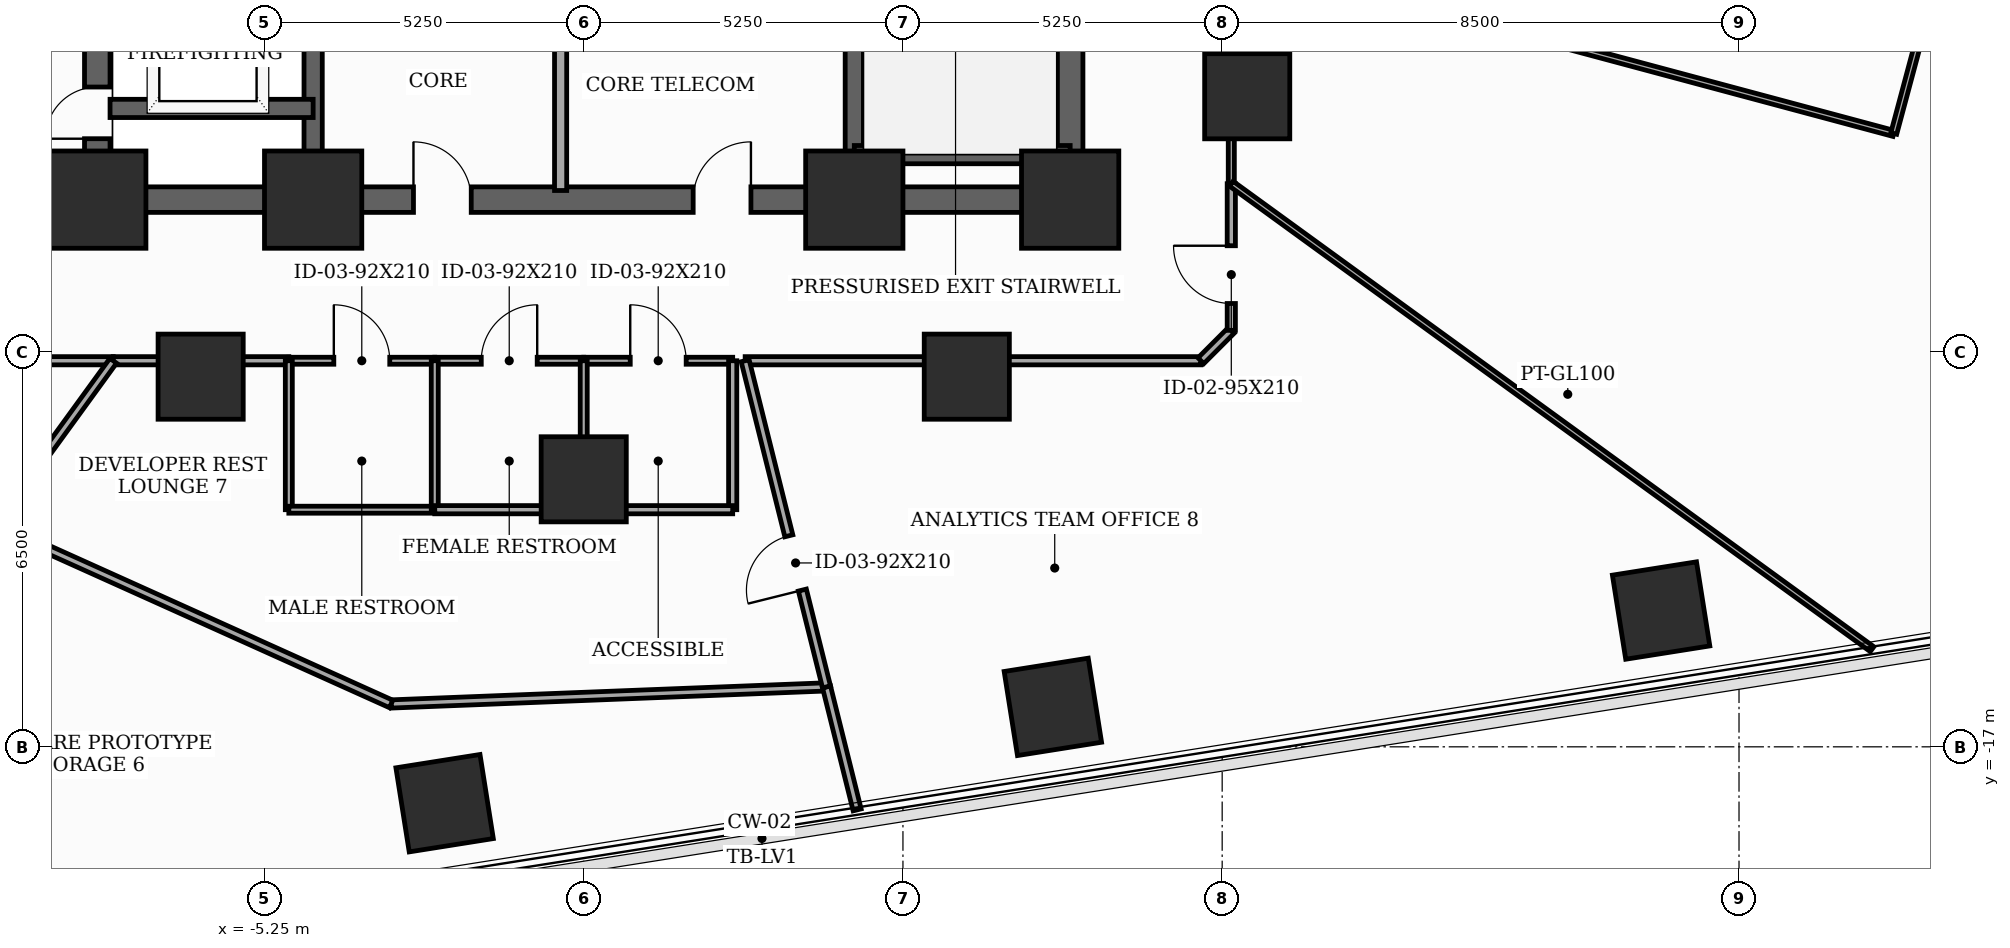
"""IFC4 building model, lengths in metres.
Left out: names, types, materials, properties, quantities, classifications, styles, units other than length and angle.
Written with IfcOpenShell. Run it as: python <this file> out.ifc"""

import sys

from ifc_helpers import new_model, si_unit, direction, frame, frame_2d, origin, origin_2d, place, context, subcontext, project, spatial, rectangle, extrude, element, fill, save


model = new_model("IFC4")
c1 = context("Model", 3, precision=1e-05, world=origin(), true_north=direction((0.0, 1.0)))
c2 = subcontext(c1, "Body", "Model", "MODEL_VIEW")
j1 = project(units=[si_unit("LENGTHUNIT", "METRE"), si_unit("PLANEANGLEUNIT", "RADIAN")], contexts=[c1])
p1 = place(None, origin())
s1 = spatial("IfcSite", under=j1, at=p1, CompositionType="ELEMENT")
p2 = place(p1, origin())
s2 = spatial("IfcBuilding", under=s1, at=p2, CompositionType="ELEMENT")
p3 = place(p2, frame((0.0, 0.0, 63.0)))
s3 = spatial("IfcBuildingStorey", under=s2, at=p3, CompositionType="ELEMENT", Elevation=63.0)
for number, where, z_axis, x_axis in (
    (1, (-8.0, -8.0, 0.0), (0.0, 0.0, 1.0), (1.0, 0.0, 0.0)),
    (2, (-4.45, -8.0, 0.0), (0.0, 0.0, 1.0), (1.0, 0.0, 0.0)),
    (3, (4.45, -8.0, 0.0), (0.0, 0.0, 1.0), (1.0, 0.0, 0.0)),
    (4, (8.0, -8.0, 0.0), (0.0, 0.0, 1.0), (1.0, 0.0, 0.0)),
):
    element("IfcColumn", number, at=place(p3, frame(where, z_axis=z_axis, x_axis=x_axis)), inside=s3, PredefinedType="COLUMN", context=c2, shape_type="SweptSolid", body=[
        extrude(rectangle(XDim=1.6, YDim=1.6, at=origin_2d()), origin(), (0.0, 0.0, 1.0), 3.7),
    ])
for number, where, z_axis, x_axis in (
    (5, (-6.3, -10.912, 0.0), (0.0, 0.0, 1.0), (1.0, 0.0, 0.0)),
    (6, (0.0, -12.6, 0.0), (0.0, 0.0, 1.0), (1.0, 0.0, 0.0)),
    (7, (6.3, -10.912, 0.0), (0.0, 0.0, 1.0), (1.0, 0.0, 0.0)),
    (8, (10.912, -6.3, 0.0), (0.0, 0.0, 1.0), (1.0, 0.0, 0.0)),
    (9, (-2.288, -17.927, 0.0), (0.0, 0.0, 1.0), (0.988, 0.156, 0.0)),
    (10, (7.716, -16.343, 0.0), (0.0, 0.0, 1.0), (0.988, 0.156, 0.0)),
    (11, (17.719, -14.758, 0.0), (0.0, 0.0, 1.0), (0.988, 0.156, 0.0)),
):
    element("IfcColumn", number, at=place(p3, frame(where, z_axis=z_axis, x_axis=x_axis)), inside=s3, PredefinedType="COLUMN", context=c2, shape_type="SweptSolid", body=[
        extrude(rectangle(XDim=1.4, YDim=1.4, at=origin_2d()), origin(), (0.0, 0.0, 1.0), 3.7),
    ])
p4 = place(p3, frame((-8.0, -8.0, 0.0), z_axis=(0.0, 0.0, 1.0), x_axis=(0.0, 1.0, 0.0)))
e12 = element("IfcWall", 12, at=p4, inside=s3, PredefinedType="SHEAR", context=c2, shape_type="SweptSolid", body=[
    extrude(rectangle(XDim=16.0, YDim=0.42, at=frame_2d((8.0, 0.0))), origin(), (0.0, 0.0, 1.0), 3.5),
])
p5 = place(p4, frame((1.002, 0.0, 0.0)))
e13 = element("IfcOpeningElement", 13, at=p5, cuts=e12, PredefinedType="OPENING", context=c2, shape_type="SweptSolid", body=[
    extrude(rectangle(XDim=0.85, YDim=2.02, at=frame_2d((0.425, 1.01))), frame((0.0, 0.22, 0.0), z_axis=(0.0, -1.0, 0.0), x_axis=(1.0, 0.0, 0.0)), (0.0, 0.0, 1.0), 0.44),
])
p6 = place(p4, frame((5.35, 0.0, 0.0)))
e14 = element("IfcOpeningElement", 14, at=p6, cuts=e12, PredefinedType="OPENING", context=c2, shape_type="SweptSolid", body=[
    extrude(rectangle(XDim=1.05, YDim=2.15, at=frame_2d((0.525, 1.075))), frame((0.0, 0.22, 0.0), z_axis=(0.0, -1.0, 0.0), x_axis=(1.0, 0.0, 0.0)), (0.0, 0.0, 1.0), 0.44),
])
p7 = place(p3, frame((8.0, -8.0, 0.0), z_axis=(0.0, 0.0, 1.0), x_axis=(0.0, 1.0, 0.0)))
e15 = element("IfcWall", 15, at=p7, inside=s3, PredefinedType="SHEAR", context=c2, shape_type="SweptSolid", body=[
    extrude(rectangle(XDim=16.0, YDim=0.42, at=frame_2d((8.0, 0.0))), origin(), (0.0, 0.0, 1.0), 3.5),
])
p8 = place(p7, frame((9.6, 0.0, 0.0)))
e16 = element("IfcOpeningElement", 16, at=p8, cuts=e15, PredefinedType="OPENING", context=c2, shape_type="SweptSolid", body=[
    extrude(rectangle(XDim=1.05, YDim=2.15, at=frame_2d((0.525, 1.075))), frame((0.0, 0.22, 0.0), z_axis=(0.0, -1.0, 0.0), x_axis=(1.0, 0.0, 0.0)), (0.0, 0.0, 1.0), 0.44),
])
p9 = place(p7, frame((14.148, 0.0, 0.0)))
e17 = element("IfcOpeningElement", 17, at=p9, cuts=e15, PredefinedType="OPENING", context=c2, shape_type="SweptSolid", body=[
    extrude(rectangle(XDim=0.85, YDim=2.02, at=frame_2d((0.425, 1.01))), frame((0.0, 0.22, 0.0), z_axis=(0.0, -1.0, 0.0), x_axis=(1.0, 0.0, 0.0)), (0.0, 0.0, 1.0), 0.44),
])
p10 = place(p3, frame((-8.0, -8.0, 0.0), z_axis=(0.0, 0.0, 1.0), x_axis=(1.0, 0.0, 0.0)))
e18 = element("IfcWall", 18, at=p10, inside=s3, PredefinedType="SHEAR", context=c2, shape_type="SweptSolid", body=[
    extrude(rectangle(XDim=16.0, YDim=0.42, at=frame_2d((8.0, 0.0))), origin(), (0.0, 0.0, 1.0), 3.5),
])
p11 = place(p10, frame((5.2, 0.0, 0.0)))
e19 = element("IfcOpeningElement", 19, at=p11, cuts=e18, PredefinedType="OPENING", context=c2, shape_type="SweptSolid", body=[
    extrude(rectangle(XDim=0.95, YDim=2.1, at=frame_2d((0.475, 1.05))), frame((0.0, 0.22, 0.0), z_axis=(0.0, -1.0, 0.0), x_axis=(1.0, 0.0, 0.0)), (0.0, 0.0, 1.0), 0.44),
])
p12 = place(p10, frame((9.8, 0.0, 0.0)))
e20 = element("IfcOpeningElement", 20, at=p12, cuts=e18, PredefinedType="OPENING", context=c2, shape_type="SweptSolid", body=[
    extrude(rectangle(XDim=0.95, YDim=2.1, at=frame_2d((0.475, 1.05))), frame((0.0, 0.22, 0.0), z_axis=(0.0, -1.0, 0.0), x_axis=(1.0, 0.0, 0.0)), (0.0, 0.0, 1.0), 0.44),
])
for number, where, z_axis, x_axis in (
    (21, (-4.45, -7.79, 0.0), (0.0, 0.0, 1.0), (0.0, 1.0, 0.0)),
    (22, (4.45, -7.79, 0.0), (0.0, 0.0, 1.0), (0.0, 1.0, 0.0)),
):
    element("IfcWall", number, at=place(p3, frame(where, z_axis=z_axis, x_axis=x_axis)), inside=s3, PredefinedType="SHEAR", context=c2, shape_type="SweptSolid", body=[
        extrude(rectangle(XDim=15.58, YDim=0.3, at=frame_2d((7.79, 0.0))), origin(), (0.0, 0.0, 1.0), 3.5),
    ])
p13 = place(p3, frame((4.45, -7.26, 0.0), z_axis=(0.0, 0.0, 1.0), x_axis=(1.0, 0.0, 0.0)))
e23 = element("IfcWall", 23, at=p13, inside=s3, PredefinedType="SHEAR", context=c2, shape_type="SweptSolid", body=[
    extrude(rectangle(XDim=3.55, YDim=0.3, at=frame_2d((1.775, 0.0))), origin(), (0.0, 0.0, 1.0), 3.5),
])
p14 = place(p3, frame((-7.79, -6.5, 0.0), z_axis=(0.0, 0.0, 1.0), x_axis=(1.0, 0.0, 0.0)))
e24 = element("IfcWall", 24, at=p14, inside=s3, PredefinedType="SHEAR", context=c2, shape_type="SweptSolid", body=[
    extrude(rectangle(XDim=3.34, YDim=0.3, at=frame_2d((1.67, 0.0))), origin(), (0.0, 0.0, 1.0), 3.5),
])
p15 = place(p3, frame((-0.38, -7.85, 0.0), z_axis=(0.0, 0.0, 1.0), x_axis=(0.0, 1.0, 0.0)))
e25 = element("IfcWall", 25, at=p15, inside=s3, PredefinedType="SOLIDWALL", context=c2, shape_type="SweptSolid", body=[
    extrude(rectangle(XDim=2.95, YDim=0.2, at=frame_2d((1.475, 0.0))), origin(), (0.0, 0.0, 1.0), 2.885),
])
p16 = place(p3, frame((10.65, -7.738, 0.0), z_axis=(0.0, 0.0, 1.0), x_axis=(0.0, 1.0, 0.0)))
e26 = element("IfcWall", 26, at=p16, inside=s3, PredefinedType="MOVABLE", context=c2, shape_type="SweptSolid", body=[
    extrude(rectangle(XDim=3.746, YDim=0.1, at=frame_2d((1.873, 0.0))), origin(), (0.0, 0.0, 1.0), 2.785),
])
p17 = place(p3, frame((10.65, -3.992, 0.0), z_axis=(0.0, 0.0, 1.0), x_axis=(0.965906888357, -0.258889712088, 0.0)))
e27 = element("IfcWall", 27, at=p17, inside=s3, PredefinedType="MOVABLE", context=c2, shape_type="SweptSolid", body=[
    extrude(rectangle(XDim=11.28, YDim=0.1, at=frame_2d((5.64, 0.0))), origin(), (0.0, 0.0, 1.0), 2.785),
])
p18 = place(p3, frame((21.545, -6.912, 0.0), z_axis=(0.0, 0.0, 1.0), x_axis=(0.259105843213, 0.965848933329, 0.0)))
e28 = element("IfcWall", 28, at=p18, inside=s3, PredefinedType="MOVABLE", context=c2, shape_type="SweptSolid", body=[
    extrude(rectangle(XDim=2.2, YDim=0.1, at=frame_2d((1.1, 0.0))), origin(), (0.0, 0.0, 1.0), 3.5),
])
p19 = place(p3, frame((-10.15, -10.65, 0.0), z_axis=(0.0, 0.0, 1.0), x_axis=(1.0, 0.0, 0.0)))
e29 = element("IfcWall", 29, at=p19, inside=s3, PredefinedType="PARTITIONING", context=c2, shape_type="SweptSolid", body=[
    extrude(rectangle(XDim=2.412, YDim=0.135, at=frame_2d((1.206, 0.0))), origin(), (0.0, 0.0, 1.0), 3.5),
])
p20 = place(p3, frame((-4.85, -10.65, 0.0), z_axis=(0.0, 0.0, 1.0), x_axis=(1.0, 0.0, 0.0)))
e30 = element("IfcWall", 30, at=p20, inside=s3, PredefinedType="PARTITIONING", context=c2, shape_type="SweptSolid", body=[
    extrude(rectangle(XDim=2.4, YDim=0.115, at=frame_2d((1.2, 0.0))), origin(), (0.0, 0.0, 1.0), 3.5),
])
p21 = place(p20, frame((0.74, 0.0, 0.0)))
e31 = element("IfcOpeningElement", 31, at=p21, cuts=e30, PredefinedType="OPENING", context=c2, shape_type="SweptSolid", body=[
    extrude(rectangle(XDim=0.92, YDim=2.1, at=frame_2d((0.46, 1.05))), frame((0.0, 0.067, 0.0), z_axis=(0.0, -1.0, 0.0), x_axis=(1.0, 0.0, 0.0)), (0.0, 0.0, 1.0), 0.135),
])
p22 = place(p3, frame((-7.738, -10.65, 0.0), z_axis=(0.0, 0.0, 1.0), x_axis=(1.0, 0.0, 0.0)))
e32 = element("IfcWall", 32, at=p22, inside=s3, PredefinedType="PARTITIONING", context=c2, shape_type="SweptSolid", body=[
    extrude(rectangle(XDim=2.888, YDim=0.135, at=frame_2d((1.444, 0.0))), origin(), (0.0, 0.0, 1.0), 2.785),
])
p23 = place(p3, frame((-2.45, -10.65, 0.0), z_axis=(0.0, 0.0, 1.0), x_axis=(1.0, 0.0, 0.0)))
e33 = element("IfcWall", 33, at=p23, inside=s3, PredefinedType="PARTITIONING", context=c2, shape_type="SweptSolid", body=[
    extrude(rectangle(XDim=2.45, YDim=0.115, at=frame_2d((1.225, 0.0))), origin(), (0.0, 0.0, 1.0), 2.785),
])
p24 = place(p23, frame((0.765, 0.0, 0.0)))
e34 = element("IfcOpeningElement", 34, at=p24, cuts=e33, PredefinedType="OPENING", context=c2, shape_type="SweptSolid", body=[
    extrude(rectangle(XDim=0.92, YDim=2.1, at=frame_2d((0.46, 1.05))), frame((0.0, 0.067, 0.0), z_axis=(0.0, -1.0, 0.0), x_axis=(1.0, 0.0, 0.0)), (0.0, 0.0, 1.0), 0.135),
])
p25 = place(p3, frame((0.0, -10.65, 0.0), z_axis=(0.0, 0.0, 1.0), x_axis=(1.0, 0.0, 0.0)))
e35 = element("IfcWall", 35, at=p25, inside=s3, PredefinedType="PARTITIONING", context=c2, shape_type="SweptSolid", body=[
    extrude(rectangle(XDim=2.45, YDim=0.115, at=frame_2d((1.225, 0.0))), origin(), (0.0, 0.0, 1.0), 3.5),
])
p26 = place(p25, frame((0.765, 0.0, 0.0)))
e36 = element("IfcOpeningElement", 36, at=p26, cuts=e35, PredefinedType="OPENING", context=c2, shape_type="SweptSolid", body=[
    extrude(rectangle(XDim=0.92, YDim=2.1, at=frame_2d((0.46, 1.05))), frame((0.0, 0.067, 0.0), z_axis=(0.0, -1.0, 0.0), x_axis=(1.0, 0.0, 0.0)), (0.0, 0.0, 1.0), 0.135),
])
p27 = place(p3, frame((2.655, -10.65, 0.0), z_axis=(0.0, 0.0, 1.0), x_axis=(1.0, 0.0, 0.0)))
e37 = element("IfcWall", 37, at=p27, inside=s3, PredefinedType="PARTITIONING", context=c2, shape_type="SweptSolid", body=[
    extrude(rectangle(XDim=7.495, YDim=0.135, at=frame_2d((3.748, 0.0))), origin(), (0.0, 0.0, 1.0), 2.785),
])
p28 = place(p3, frame((10.15, -10.65, 0.0), z_axis=(0.0, 0.0, 1.0), x_axis=(0.707106781187, 0.707106781187, 0.0)))
e38 = element("IfcWall", 38, at=p28, inside=s3, PredefinedType="PARTITIONING", context=c2, shape_type="SweptSolid", body=[
    extrude(rectangle(XDim=0.707, YDim=0.135, at=frame_2d((0.354, 0.0))), origin(), (0.0, 0.0, 1.0), 3.5),
])
p29 = place(p3, frame((10.65, -10.15, 0.0), z_axis=(0.0, 0.0, 1.0), x_axis=(0.0, 1.0, 0.0)))
e39 = element("IfcWall", 39, at=p29, inside=s3, PredefinedType="PARTITIONING", context=c2, shape_type="SweptSolid", body=[
    extrude(rectangle(XDim=2.412, YDim=0.135, at=frame_2d((1.206, 0.0))), origin(), (0.0, 0.0, 1.0), 3.5),
])
p30 = place(p29, frame((0.442, 0.0, 0.0)))
e40 = element("IfcOpeningElement", 40, at=p30, cuts=e39, PredefinedType="OPENING", context=c2, shape_type="SweptSolid", body=[
    extrude(rectangle(XDim=0.95, YDim=2.1, at=frame_2d((0.475, 1.05))), frame((0.0, 0.077, 0.0), z_axis=(0.0, -1.0, 0.0), x_axis=(1.0, 0.0, 0.0)), (0.0, 0.0, 1.0), 0.155),
])
p31 = place(p3, frame((10.65, -7.738, 0.0), z_axis=(0.0, 0.0, 1.0), x_axis=(0.809048025811, -0.587742538814, 0.0)))
e41 = element("IfcWall", 41, at=p31, inside=s3, PredefinedType="MOVABLE", context=c2, shape_type="SweptSolid", body=[
    extrude(rectangle(XDim=13.025, YDim=0.1, at=frame_2d((6.513, 0.0))), origin(), (0.0, 0.0, 1.0), 2.785),
])
p32 = place(p3, frame((-9.701, -13.352, 0.0), z_axis=(0.0, 0.0, 1.0), x_axis=(0.587719574609, 0.809064707932, 0.0)))
e42 = element("IfcWall", 42, at=p32, inside=s3, PredefinedType="PARTITIONING", context=c2, shape_type="SweptSolid", body=[
    extrude(rectangle(XDim=3.34, YDim=0.135, at=frame_2d((1.67, 0.0))), origin(), (0.0, 0.0, 1.0), 3.5),
])
p33 = place(p3, frame((3.993, -16.014, 0.0), z_axis=(0.0, 0.0, 1.0), x_axis=(-0.999230720769, -0.039216918185, 0.0)))
e43 = element("IfcWall", 43, at=p33, inside=s3, PredefinedType="PARTITIONING", context=c2, shape_type="SweptSolid", body=[
    extrude(rectangle(XDim=7.166, YDim=0.135, at=frame_2d((3.583, 0.0))), origin(), (0.0, 0.0, 1.0), 2.785),
])
p34 = place(p3, frame((-3.167, -16.295, 0.0), z_axis=(0.0, 0.0, 1.0), x_axis=(-0.911785675506, 0.410666387645, 0.0)))
e44 = element("IfcWall", 44, at=p34, inside=s3, PredefinedType="PARTITIONING", context=c2, shape_type="SweptSolid", body=[
    extrude(rectangle(XDim=7.166, YDim=0.135, at=frame_2d((3.583, 0.0))), origin(), (0.0, 0.0, 1.0), 2.785),
])
p35 = place(p3, frame((4.497, -18.037, 0.0), z_axis=(0.0, 0.0, 1.0), x_axis=(-0.24157117672, 0.970383102995, 0.0)))
e45 = element("IfcWall", 45, at=p35, inside=s3, PredefinedType="PARTITIONING", context=c2, shape_type="SweptSolid", body=[
    extrude(rectangle(XDim=2.085, YDim=0.135, at=frame_2d((1.042, 0.0))), origin(), (0.0, 0.0, 1.0), 2.935),
])
p36 = place(p3, frame((-4.85, -10.65, 0.0), z_axis=(0.0, 0.0, 1.0), x_axis=(0.0, -1.0, 0.0)))
e46 = element("IfcWall", 46, at=p36, inside=s3, PredefinedType="PARTITIONING", context=c2, shape_type="SweptSolid", body=[
    extrude(rectangle(XDim=2.45, YDim=0.115, at=frame_2d((1.225, 0.0))), origin(), (0.0, 0.0, 1.0), 2.785),
])
p37 = place(p3, frame((-4.85, -13.1, 0.0), z_axis=(0.0, 0.0, 1.0), x_axis=(1.0, 0.0, 0.0)))
e47 = element("IfcWall", 47, at=p37, inside=s3, PredefinedType="PARTITIONING", context=c2, shape_type="SweptSolid", body=[
    extrude(rectangle(XDim=2.4, YDim=0.115, at=frame_2d((1.2, 0.0))), origin(), (0.0, 0.0, 1.0), 3.5),
])
p38 = place(p3, frame((-2.45, -13.1, 0.0), z_axis=(0.0, 0.0, 1.0), x_axis=(0.0, 1.0, 0.0)))
e48 = element("IfcWall", 48, at=p38, inside=s3, PredefinedType="PARTITIONING", context=c2, shape_type="SweptSolid", body=[
    extrude(rectangle(XDim=2.45, YDim=0.115, at=frame_2d((1.225, 0.0))), origin(), (0.0, 0.0, 1.0), 2.785),
])
p39 = place(p3, frame((0.0, -13.1, 0.0), z_axis=(0.0, 0.0, 1.0), x_axis=(-1.0, 0.0, 0.0)))
e49 = element("IfcWall", 49, at=p39, inside=s3, PredefinedType="PARTITIONING", context=c2, shape_type="SweptSolid", body=[
    extrude(rectangle(XDim=2.45, YDim=0.135, at=frame_2d((1.225, 0.0))), origin(), (0.0, 0.0, 1.0), 2.785),
])
p40 = place(p3, frame((2.45, -10.65, 0.0), z_axis=(0.0, 0.0, 1.0), x_axis=(0.0, -1.0, 0.0)))
e50 = element("IfcWall", 50, at=p40, inside=s3, PredefinedType="PARTITIONING", context=c2, shape_type="SweptSolid", body=[
    extrude(rectangle(XDim=2.45, YDim=0.135, at=frame_2d((1.225, 0.0))), origin(), (0.0, 0.0, 1.0), 2.785),
])
p41 = place(p3, frame((2.45, -13.1, 0.0), z_axis=(0.0, 0.0, 1.0), x_axis=(-1.0, 0.0, 0.0)))
e51 = element("IfcWall", 51, at=p41, inside=s3, PredefinedType="PARTITIONING", context=c2, shape_type="SweptSolid", body=[
    extrude(rectangle(XDim=2.45, YDim=0.135, at=frame_2d((1.225, 0.0))), origin(), (0.0, 0.0, 1.0), 2.785),
])
p42 = place(p3, frame((3.993, -16.014, 0.0), z_axis=(0.0, 0.0, 1.0), x_axis=(-0.242005649473, 0.97027484025, 0.0)))
e52 = element("IfcWall", 52, at=p42, inside=s3, PredefinedType="PARTITIONING", context=c2, shape_type="SweptSolid", body=[
    extrude(rectangle(XDim=5.528, YDim=0.135, at=frame_2d((2.764, 0.0))), origin(), (0.0, 0.0, 1.0), 2.785),
])
p43 = place(p42, frame((1.641, 0.0, 0.0)))
e53 = element("IfcOpeningElement", 53, at=p43, cuts=e52, PredefinedType="OPENING", context=c2, shape_type="SweptSolid", body=[
    extrude(rectangle(XDim=0.92, YDim=2.1, at=frame_2d((0.46, 1.05))), frame((0.0, 0.077, 0.0), z_axis=(0.0, -1.0, 0.0), x_axis=(1.0, 0.0, 0.0)), (0.0, 0.0, 1.0), 0.155),
])
p44 = place(p3, frame((0.0, -13.1, 0.0), z_axis=(0.0, 0.0, 1.0), x_axis=(0.0, 1.0, 0.0)))
e54 = element("IfcWall", 54, at=p44, inside=s3, PredefinedType="PARTITIONING", context=c2, shape_type="SweptSolid", body=[
    extrude(rectangle(XDim=2.45, YDim=0.115, at=frame_2d((1.225, 0.0))), origin(), (0.0, 0.0, 1.0), 2.785),
])
p45 = place(p5, origin())
e55 = element("IfcDoor", 55, at=p45, inside=s3, OperationType="SINGLE_SWING_LEFT", PredefinedType="TRAPDOOR", context=c2, shape_type="SweptSolid", body=[
    extrude(rectangle(XDim=0.85, YDim=2.02, at=frame_2d((0.425, 1.01))), frame((0.0, 0.025, 0.0), z_axis=(0.0, -1.0, 0.0), x_axis=(1.0, 0.0, 0.0)), (0.0, 0.0, 1.0), 0.05),
])
fill(e13, e55)
p46 = place(p11, origin())
e56 = element("IfcDoor", 56, at=p46, inside=s3, OperationType="SINGLE_SWING_LEFT", PredefinedType="DOOR", context=c2, shape_type="SweptSolid", body=[
    extrude(rectangle(XDim=0.95, YDim=2.1, at=frame_2d((0.475, 1.05))), frame((0.0, 0.025, 0.0), z_axis=(0.0, -1.0, 0.0), x_axis=(1.0, 0.0, 0.0)), (0.0, 0.0, 1.0), 0.05),
])
fill(e19, e56)
p47 = place(p12, origin())
e57 = element("IfcDoor", 57, at=p47, inside=s3, OperationType="SINGLE_SWING_RIGHT", PredefinedType="DOOR", context=c2, shape_type="SweptSolid", body=[
    extrude(rectangle(XDim=0.95, YDim=2.1, at=frame_2d((0.475, 1.05))), frame((0.0, 0.025, 0.0), z_axis=(0.0, -1.0, 0.0), x_axis=(1.0, 0.0, 0.0)), (0.0, 0.0, 1.0), 0.05),
])
fill(e20, e57)
p48 = place(p21, origin())
e58 = element("IfcDoor", 58, at=p48, inside=s3, OperationType="SINGLE_SWING_LEFT", PredefinedType="DOOR", context=c2, shape_type="SweptSolid", body=[
    extrude(rectangle(XDim=0.92, YDim=2.1, at=frame_2d((0.46, 1.05))), frame((0.0, 0.025, 0.0), z_axis=(0.0, -1.0, 0.0), x_axis=(1.0, 0.0, 0.0)), (0.0, 0.0, 1.0), 0.05),
])
fill(e31, e58)
p49 = place(p24, origin())
e59 = element("IfcDoor", 59, at=p49, inside=s3, OperationType="SINGLE_SWING_RIGHT", PredefinedType="DOOR", context=c2, shape_type="SweptSolid", body=[
    extrude(rectangle(XDim=0.92, YDim=2.1, at=frame_2d((0.46, 1.05))), frame((0.0, 0.025, 0.0), z_axis=(0.0, -1.0, 0.0), x_axis=(1.0, 0.0, 0.0)), (0.0, 0.0, 1.0), 0.05),
])
fill(e34, e59)
p50 = place(p26, origin())
e60 = element("IfcDoor", 60, at=p50, inside=s3, OperationType="SINGLE_SWING_LEFT", PredefinedType="DOOR", context=c2, shape_type="SweptSolid", body=[
    extrude(rectangle(XDim=0.92, YDim=2.1, at=frame_2d((0.46, 1.05))), frame((0.0, 0.025, 0.0), z_axis=(0.0, -1.0, 0.0), x_axis=(1.0, 0.0, 0.0)), (0.0, 0.0, 1.0), 0.05),
])
fill(e36, e60)
p51 = place(p30, origin())
e61 = element("IfcDoor", 61, at=p51, inside=s3, OperationType="SINGLE_SWING_RIGHT", PredefinedType="DOOR", context=c2, shape_type="SweptSolid", body=[
    extrude(rectangle(XDim=0.95, YDim=2.1, at=frame_2d((0.475, 1.05))), frame((0.0, 0.025, 0.0), z_axis=(0.0, -1.0, 0.0), x_axis=(1.0, 0.0, 0.0)), (0.0, 0.0, 1.0), 0.05),
])
fill(e40, e61)
p52 = place(p43, origin())
e62 = element("IfcDoor", 62, at=p52, inside=s3, OperationType="SINGLE_SWING_LEFT", PredefinedType="DOOR", context=c2, shape_type="SweptSolid", body=[
    extrude(rectangle(XDim=0.92, YDim=2.1, at=frame_2d((0.46, 1.05))), frame((0.0, 0.025, 0.0), z_axis=(0.0, -1.0, 0.0), x_axis=(1.0, 0.0, 0.0)), (0.0, 0.0, 1.0), 0.05),
])
fill(e53, e62)
save(model, sys.argv[1])
